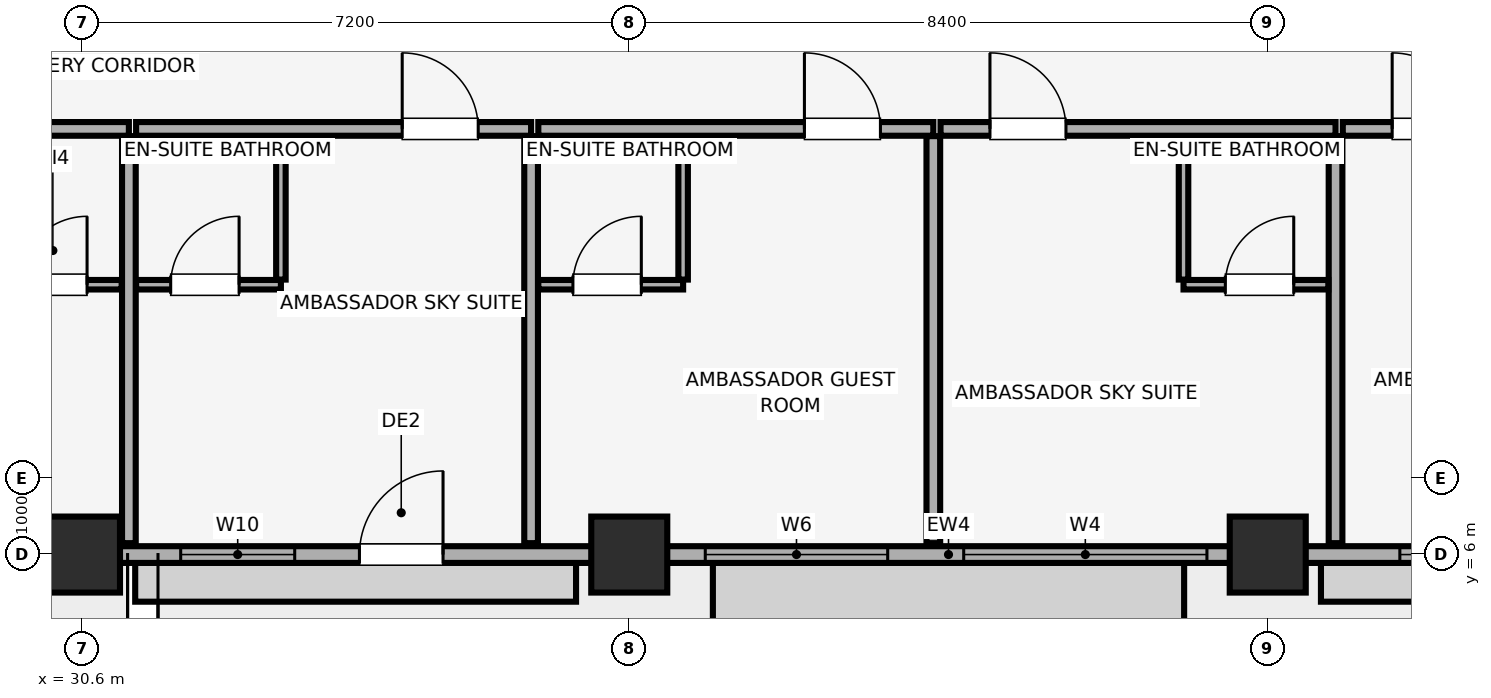
"""IFC4 building model, lengths in metres.
Left out: names, types, materials, properties, quantities, classifications, styles, units other than length and angle.
Written with IfcOpenShell. Run it as: python <this file> out.ifc"""

import sys

from ifc_helpers import new_model, si_unit, direction, frame, frame_2d, origin, origin_2d, place, context, subcontext, project, spatial, rectangle, extrude, element, fill, save


model = new_model("IFC4")
c1 = context("Model", 3, precision=1e-05, world=origin(), true_north=direction((0.0, 1.0)))
c2 = subcontext(c1, "Body", "Model", "MODEL_VIEW")
j1 = project(units=[si_unit("LENGTHUNIT", "METRE"), si_unit("PLANEANGLEUNIT", "RADIAN")], contexts=[c1])
p1 = place(None, origin())
s1 = spatial("IfcSite", under=j1, at=p1, CompositionType="ELEMENT")
p2 = place(p1, origin())
s2 = spatial("IfcBuilding", under=s1, at=p2, CompositionType="ELEMENT")
p3 = place(p2, frame((0.0, 0.0, 229.15)))
s3 = spatial("IfcBuildingStorey", under=s2, at=p3, CompositionType="ELEMENT", Elevation=229.15)
for number, where, z_axis, x_axis in (
    (1, (30.6, 6.0, 0.0), (0.0, 0.0, 1.0), (1.0, 0.0, 0.0)),
    (2, (37.8, 6.0, 0.0), (0.0, 0.0, 1.0), (1.0, 0.0, 0.0)),
    (3, (46.2, 6.0, 0.0), (0.0, 0.0, 1.0), (1.0, 0.0, 0.0)),
):
    element("IfcColumn", number, at=place(p3, frame(where, z_axis=z_axis, x_axis=x_axis)), inside=s3, PredefinedType="COLUMN", context=c2, shape_type="SweptSolid", body=[
        extrude(rectangle(XDim=1.0, YDim=1.0, at=origin_2d()), origin(), (0.0, 0.0, 1.0), 3.71),
    ])
p4 = place(p3, frame((9.8, 6.0, 0.0), z_axis=(0.0, 0.0, 1.0), x_axis=(1.0, 0.0, 0.0)))
e4 = element("IfcWall", 4, at=p4, inside=s3, PredefinedType="SOLIDWALL", context=c2, shape_type="SweptSolid", body=[
    extrude(rectangle(XDim=64.4, YDim=0.22, at=frame_2d((32.2, 0.0))), origin(), (0.0, 0.0, 1.0), 2.91),
])
p5 = place(p4, frame((3.25, 0.0, 0.0)))
e5 = element("IfcOpeningElement", 5, at=p5, cuts=e4, PredefinedType="OPENING", context=c2, shape_type="SweptSolid", body=[
    extrude(rectangle(XDim=1.1, YDim=2.15, at=frame_2d((0.55, 1.075))), frame((0.0, 0.12, 0.0), z_axis=(0.0, -1.0, 0.0), x_axis=(1.0, 0.0, 0.0)), (0.0, 0.0, 1.0), 0.24),
])
p6 = place(p4, frame((24.45, 0.0, 0.0)))
e6 = element("IfcOpeningElement", 6, at=p6, cuts=e4, PredefinedType="OPENING", context=c2, shape_type="SweptSolid", body=[
    extrude(rectangle(XDim=1.1, YDim=2.15, at=frame_2d((0.55, 1.075))), frame((0.0, 0.12, 0.0), z_axis=(0.0, -1.0, 0.0), x_axis=(1.0, 0.0, 0.0)), (0.0, 0.0, 1.0), 0.24),
])
p7 = place(p4, frame((45.65, 0.0, 0.0)))
e7 = element("IfcOpeningElement", 7, at=p7, cuts=e4, PredefinedType="OPENING", context=c2, shape_type="SweptSolid", body=[
    extrude(rectangle(XDim=1.1, YDim=2.15, at=frame_2d((0.55, 1.075))), frame((0.0, 0.12, 0.0), z_axis=(0.0, -1.0, 0.0), x_axis=(1.0, 0.0, 0.0)), (0.0, 0.0, 1.0), 0.24),
])
p8 = place(p4, frame((0.825, 0.0, 0.85)))
e8 = element("IfcOpeningElement", 8, at=p8, cuts=e4, PredefinedType="OPENING", context=c2, shape_type="SweptSolid", body=[
    extrude(rectangle(XDim=1.5, YDim=1.4, at=frame_2d((0.75, 0.7))), frame((0.0, 0.12, 0.0), z_axis=(0.0, -1.0, 0.0), x_axis=(1.0, 0.0, 0.0)), (0.0, 0.0, 1.0), 0.24),
])
p9 = place(p4, frame((7.217, 0.0, 0.85)))
e9 = element("IfcOpeningElement", 9, at=p9, cuts=e4, PredefinedType="OPENING", context=c2, shape_type="SweptSolid", body=[
    extrude(rectangle(XDim=3.2, YDim=1.85, at=frame_2d((1.6, 0.925))), frame((0.0, 0.12, 0.0), z_axis=(0.0, -1.0, 0.0), x_axis=(1.0, 0.0, 0.0)), (0.0, 0.0, 1.0), 0.24),
])
p10 = place(p4, frame((11.267, 0.0, 0.85)))
e10 = element("IfcOpeningElement", 10, at=p10, cuts=e4, PredefinedType="OPENING", context=c2, shape_type="SweptSolid", body=[
    extrude(rectangle(XDim=1.5, YDim=1.4, at=frame_2d((0.75, 0.7))), frame((0.0, 0.12, 0.0), z_axis=(0.0, -1.0, 0.0), x_axis=(1.0, 0.0, 0.0)), (0.0, 0.0, 1.0), 0.24),
])
p11 = place(p4, frame((16.663, 0.0, 0.85)))
e11 = element("IfcOpeningElement", 11, at=p11, cuts=e4, PredefinedType="OPENING", context=c2, shape_type="SweptSolid", body=[
    extrude(rectangle(XDim=3.2, YDim=1.85, at=frame_2d((1.6, 0.925))), frame((0.0, 0.12, 0.0), z_axis=(0.0, -1.0, 0.0), x_axis=(1.0, 0.0, 0.0)), (0.0, 0.0, 1.0), 0.24),
])
p12 = place(p4, frame((22.098, 0.0, 0.85)))
e12 = element("IfcOpeningElement", 12, at=p12, cuts=e4, PredefinedType="OPENING", context=c2, shape_type="SweptSolid", body=[
    extrude(rectangle(XDim=1.5, YDim=1.4, at=frame_2d((0.75, 0.7))), frame((0.0, 0.12, 0.0), z_axis=(0.0, -1.0, 0.0), x_axis=(1.0, 0.0, 0.0)), (0.0, 0.0, 1.0), 0.24),
])
p13 = place(p4, frame((29.0, 0.0, 0.85)))
e13 = element("IfcOpeningElement", 13, at=p13, cuts=e4, PredefinedType="OPENING", context=c2, shape_type="SweptSolid", body=[
    extrude(rectangle(XDim=2.4, YDim=1.5, at=frame_2d((1.2, 0.75))), frame((0.0, 0.12, 0.0), z_axis=(0.0, -1.0, 0.0), x_axis=(1.0, 0.0, 0.0)), (0.0, 0.0, 1.0), 0.24),
])
p14 = place(p4, frame((32.4, 0.0, 0.85)))
e14 = element("IfcOpeningElement", 14, at=p14, cuts=e4, PredefinedType="OPENING", context=c2, shape_type="SweptSolid", body=[
    extrude(rectangle(XDim=3.2, YDim=1.85, at=frame_2d((1.6, 0.925))), frame((0.0, 0.12, 0.0), z_axis=(0.0, -1.0, 0.0), x_axis=(1.0, 0.0, 0.0)), (0.0, 0.0, 1.0), 0.24),
])
p15 = place(p4, frame((38.138, 0.0, 0.85)))
e15 = element("IfcOpeningElement", 15, at=p15, cuts=e4, PredefinedType="OPENING", context=c2, shape_type="SweptSolid", body=[
    extrude(rectangle(XDim=3.6, YDim=1.75, at=frame_2d((1.8, 0.875))), frame((0.0, 0.12, 0.0), z_axis=(0.0, -1.0, 0.0), x_axis=(1.0, 0.0, 0.0)), (0.0, 0.0, 1.0), 0.24),
])
p16 = place(p4, frame((48.387, 0.0, 0.85)))
e16 = element("IfcOpeningElement", 16, at=p16, cuts=e4, PredefinedType="OPENING", context=c2, shape_type="SweptSolid", body=[
    extrude(rectangle(XDim=1.5, YDim=1.4, at=frame_2d((0.75, 0.7))), frame((0.0, 0.12, 0.0), z_axis=(0.0, -1.0, 0.0), x_axis=(1.0, 0.0, 0.0)), (0.0, 0.0, 1.0), 0.24),
])
p17 = place(p4, frame((53.583, 0.0, 0.85)))
e17 = element("IfcOpeningElement", 17, at=p17, cuts=e4, PredefinedType="OPENING", context=c2, shape_type="SweptSolid", body=[
    extrude(rectangle(XDim=3.6, YDim=1.75, at=frame_2d((1.8, 0.875))), frame((0.0, 0.12, 0.0), z_axis=(0.0, -1.0, 0.0), x_axis=(1.0, 0.0, 0.0)), (0.0, 0.0, 1.0), 0.24),
])
p18 = place(p4, frame((59.695, 0.0, 0.85)))
e18 = element("IfcOpeningElement", 18, at=p18, cuts=e4, PredefinedType="OPENING", context=c2, shape_type="SweptSolid", body=[
    extrude(rectangle(XDim=3.6, YDim=1.75, at=frame_2d((1.8, 0.875))), frame((0.0, 0.12, 0.0), z_axis=(0.0, -1.0, 0.0), x_axis=(1.0, 0.0, 0.0)), (0.0, 0.0, 1.0), 0.24),
])
p19 = place(p3, frame((26.02, 11.6, 0.0), z_axis=(0.0, 0.0, 1.0), x_axis=(1.0, 0.0, 0.0)))
e19 = element("IfcWall", 19, at=p19, inside=s3, PredefinedType="PARTITIONING", context=c2, shape_type="SweptSolid", body=[
    extrude(rectangle(XDim=5.197, YDim=0.18, at=frame_2d((2.598, 0.0))), origin(), (0.0, 0.0, 1.0), 3.71),
])
p20 = place(p19, frame((0.65, 0.0, 0.0)))
e20 = element("IfcOpeningElement", 20, at=p20, cuts=e19, PredefinedType="OPENING", context=c2, shape_type="SweptSolid", body=[
    extrude(rectangle(XDim=1.0, YDim=2.15, at=frame_2d((0.5, 1.075))), frame((0.0, 0.1, 0.0), z_axis=(0.0, -1.0, 0.0), x_axis=(1.0, 0.0, 0.0)), (0.0, 0.0, 1.0), 0.2),
])
p21 = place(p3, frame((31.217, 6.15, 0.0), z_axis=(0.0, 0.0, 1.0), x_axis=(0.0, 1.0, 0.0)))
e21 = element("IfcWall", 21, at=p21, inside=s3, PredefinedType="PARTITIONING", context=c2, shape_type="SweptSolid", body=[
    extrude(rectangle(XDim=5.355, YDim=0.18, at=frame_2d((2.677, 0.0))), origin(), (0.0, 0.0, 1.0), 3.71),
])
p22 = place(p3, frame((29.217, 9.55, 0.0), z_axis=(0.0, 0.0, 1.0), x_axis=(1.0, 0.0, 0.0)))
e22 = element("IfcWall", 22, at=p22, inside=s3, PredefinedType="PARTITIONING", context=c2, shape_type="SweptSolid", body=[
    extrude(rectangle(XDim=1.905, YDim=0.125, at=frame_2d((0.953, 0.0))), origin(), (0.0, 0.0, 1.0), 3.71),
])
p23 = place(p22, frame((0.55, 0.0, 0.0)))
e23 = element("IfcOpeningElement", 23, at=p23, cuts=e22, PredefinedType="OPENING", context=c2, shape_type="SweptSolid", body=[
    extrude(rectangle(XDim=0.9, YDim=2.1, at=frame_2d((0.45, 1.05))), frame((0.0, 0.073, 0.0), z_axis=(0.0, -1.0, 0.0), x_axis=(1.0, 0.0, 0.0)), (0.0, 0.0, 1.0), 0.145),
])
p24 = place(p3, frame((31.312, 11.6, 0.0), z_axis=(0.0, 0.0, 1.0), x_axis=(1.0, 0.0, 0.0)))
e24 = element("IfcWall", 24, at=p24, inside=s3, PredefinedType="PARTITIONING", context=c2, shape_type="SweptSolid", body=[
    extrude(rectangle(XDim=5.197, YDim=0.18, at=frame_2d((2.598, 0.0))), origin(), (0.0, 0.0, 1.0), 3.71),
])
p25 = place(p24, frame((3.501, 0.0, 0.0)))
e25 = element("IfcOpeningElement", 25, at=p25, cuts=e24, PredefinedType="OPENING", context=c2, shape_type="SweptSolid", body=[
    extrude(rectangle(XDim=1.0, YDim=2.15, at=frame_2d((0.5, 1.075))), frame((0.0, 0.1, 0.0), z_axis=(0.0, -1.0, 0.0), x_axis=(1.0, 0.0, 0.0)), (0.0, 0.0, 1.0), 0.2),
])
p26 = place(p3, frame((36.509, 6.15, 0.0), z_axis=(0.0, 0.0, 1.0), x_axis=(0.0, 1.0, 0.0)))
e26 = element("IfcWall", 26, at=p26, inside=s3, PredefinedType="PARTITIONING", context=c2, shape_type="SweptSolid", body=[
    extrude(rectangle(XDim=5.355, YDim=0.18, at=frame_2d((2.677, 0.0))), origin(), (0.0, 0.0, 1.0), 3.71),
])
p27 = place(p3, frame((31.312, 9.55, 0.0), z_axis=(0.0, 0.0, 1.0), x_axis=(1.0, 0.0, 0.0)))
e27 = element("IfcWall", 27, at=p27, inside=s3, PredefinedType="PARTITIONING", context=c2, shape_type="SweptSolid", body=[
    extrude(rectangle(XDim=1.905, YDim=0.125, at=frame_2d((0.952, 0.0))), origin(), (0.0, 0.0, 1.0), 3.71),
])
p28 = place(p27, frame((0.455, 0.0, 0.0)))
e28 = element("IfcOpeningElement", 28, at=p28, cuts=e27, PredefinedType="OPENING", context=c2, shape_type="SweptSolid", body=[
    extrude(rectangle(XDim=0.9, YDim=2.1, at=frame_2d((0.45, 1.05))), frame((0.0, 0.073, 0.0), z_axis=(0.0, -1.0, 0.0), x_axis=(1.0, 0.0, 0.0)), (0.0, 0.0, 1.0), 0.145),
])
p29 = place(p3, frame((33.217, 9.617, 0.0), z_axis=(0.0, 0.0, 1.0), x_axis=(0.0, 1.0, 0.0)))
e29 = element("IfcWall", 29, at=p29, inside=s3, PredefinedType="PARTITIONING", context=c2, shape_type="SweptSolid", body=[
    extrude(rectangle(XDim=1.887, YDim=0.125, at=frame_2d((0.944, 0.0))), origin(), (0.0, 0.0, 1.0), 3.71),
])
p30 = place(p3, frame((36.604, 11.6, 0.0), z_axis=(0.0, 0.0, 1.0), x_axis=(1.0, 0.0, 0.0)))
e30 = element("IfcWall", 30, at=p30, inside=s3, PredefinedType="PARTITIONING", context=c2, shape_type="SweptSolid", body=[
    extrude(rectangle(XDim=5.197, YDim=0.18, at=frame_2d((2.598, 0.0))), origin(), (0.0, 0.0, 1.0), 3.71),
])
p31 = place(p30, frame((3.501, 0.0, 0.0)))
e31 = element("IfcOpeningElement", 31, at=p31, cuts=e30, PredefinedType="OPENING", context=c2, shape_type="SweptSolid", body=[
    extrude(rectangle(XDim=1.0, YDim=2.15, at=frame_2d((0.5, 1.075))), frame((0.0, 0.1, 0.0), z_axis=(0.0, -1.0, 0.0), x_axis=(1.0, 0.0, 0.0)), (0.0, 0.0, 1.0), 0.2),
])
p32 = place(p3, frame((41.8, 6.15, 0.0), z_axis=(0.0, 0.0, 1.0), x_axis=(0.0, 1.0, 0.0)))
e32 = element("IfcWall", 32, at=p32, inside=s3, PredefinedType="PARTITIONING", context=c2, shape_type="SweptSolid", body=[
    extrude(rectangle(XDim=5.355, YDim=0.18, at=frame_2d((2.677, 0.0))), origin(), (0.0, 0.0, 1.0), 3.26),
])
p33 = place(p3, frame((36.604, 9.55, 0.0), z_axis=(0.0, 0.0, 1.0), x_axis=(1.0, 0.0, 0.0)))
e33 = element("IfcWall", 33, at=p33, inside=s3, PredefinedType="PARTITIONING", context=c2, shape_type="SweptSolid", body=[
    extrude(rectangle(XDim=1.905, YDim=0.125, at=frame_2d((0.953, 0.0))), origin(), (0.0, 0.0, 1.0), 3.71),
])
p34 = place(p33, frame((0.455, 0.0, 0.0)))
e34 = element("IfcOpeningElement", 34, at=p34, cuts=e33, PredefinedType="OPENING", context=c2, shape_type="SweptSolid", body=[
    extrude(rectangle(XDim=0.9, YDim=2.1, at=frame_2d((0.45, 1.05))), frame((0.0, 0.073, 0.0), z_axis=(0.0, -1.0, 0.0), x_axis=(1.0, 0.0, 0.0)), (0.0, 0.0, 1.0), 0.145),
])
p35 = place(p3, frame((38.509, 9.617, 0.0), z_axis=(0.0, 0.0, 1.0), x_axis=(0.0, 1.0, 0.0)))
e35 = element("IfcWall", 35, at=p35, inside=s3, PredefinedType="PARTITIONING", context=c2, shape_type="SweptSolid", body=[
    extrude(rectangle(XDim=1.887, YDim=0.125, at=frame_2d((0.944, 0.0))), origin(), (0.0, 0.0, 1.0), 3.71),
])
p36 = place(p3, frame((41.895, 11.6, 0.0), z_axis=(0.0, 0.0, 1.0), x_axis=(1.0, 0.0, 0.0)))
e36 = element("IfcWall", 36, at=p36, inside=s3, PredefinedType="PARTITIONING", context=c2, shape_type="SweptSolid", body=[
    extrude(rectangle(XDim=5.197, YDim=0.18, at=frame_2d((2.598, 0.0))), origin(), (0.0, 0.0, 1.0), 3.71),
])
p37 = place(p36, frame((0.65, 0.0, 0.0)))
e37 = element("IfcOpeningElement", 37, at=p37, cuts=e36, PredefinedType="OPENING", context=c2, shape_type="SweptSolid", body=[
    extrude(rectangle(XDim=1.0, YDim=2.15, at=frame_2d((0.5, 1.075))), frame((0.0, 0.1, 0.0), z_axis=(0.0, -1.0, 0.0), x_axis=(1.0, 0.0, 0.0)), (0.0, 0.0, 1.0), 0.2),
])
p38 = place(p3, frame((47.092, 6.15, 0.0), z_axis=(0.0, 0.0, 1.0), x_axis=(0.0, 1.0, 0.0)))
e38 = element("IfcWall", 38, at=p38, inside=s3, PredefinedType="PARTITIONING", context=c2, shape_type="SweptSolid", body=[
    extrude(rectangle(XDim=5.355, YDim=0.18, at=frame_2d((2.677, 0.0))), origin(), (0.0, 0.0, 1.0), 3.71),
])
p39 = place(p3, frame((45.092, 9.55, 0.0), z_axis=(0.0, 0.0, 1.0), x_axis=(1.0, 0.0, 0.0)))
e39 = element("IfcWall", 39, at=p39, inside=s3, PredefinedType="PARTITIONING", context=c2, shape_type="SweptSolid", body=[
    extrude(rectangle(XDim=1.905, YDim=0.125, at=frame_2d((0.953, 0.0))), origin(), (0.0, 0.0, 1.0), 3.71),
])
p40 = place(p39, frame((0.55, 0.0, 0.0)))
e40 = element("IfcOpeningElement", 40, at=p40, cuts=e39, PredefinedType="OPENING", context=c2, shape_type="SweptSolid", body=[
    extrude(rectangle(XDim=0.9, YDim=2.1, at=frame_2d((0.45, 1.05))), frame((0.0, 0.073, 0.0), z_axis=(0.0, -1.0, 0.0), x_axis=(1.0, 0.0, 0.0)), (0.0, 0.0, 1.0), 0.145),
])
p41 = place(p3, frame((45.092, 9.617, 0.0), z_axis=(0.0, 0.0, 1.0), x_axis=(0.0, 1.0, 0.0)))
e41 = element("IfcWall", 41, at=p41, inside=s3, PredefinedType="PARTITIONING", context=c2, shape_type="SweptSolid", body=[
    extrude(rectangle(XDim=1.887, YDim=0.125, at=frame_2d((0.944, 0.0))), origin(), (0.0, 0.0, 1.0), 3.71),
])
p42 = place(p3, frame((47.187, 11.6, 0.0), z_axis=(0.0, 0.0, 1.0), x_axis=(1.0, 0.0, 0.0)))
e42 = element("IfcWall", 42, at=p42, inside=s3, PredefinedType="PARTITIONING", context=c2, shape_type="SweptSolid", body=[
    extrude(rectangle(XDim=5.197, YDim=0.18, at=frame_2d((2.598, 0.0))), origin(), (0.0, 0.0, 1.0), 3.71),
])
p43 = place(p42, frame((0.65, 0.0, 0.0)))
e43 = element("IfcOpeningElement", 43, at=p43, cuts=e42, PredefinedType="OPENING", context=c2, shape_type="SweptSolid", body=[
    extrude(rectangle(XDim=1.0, YDim=2.15, at=frame_2d((0.5, 1.075))), frame((0.0, 0.1, 0.0), z_axis=(0.0, -1.0, 0.0), x_axis=(1.0, 0.0, 0.0)), (0.0, 0.0, 1.0), 0.2),
])
p44 = place(p6, origin())
e44 = element("IfcDoor", 44, at=p44, inside=s3, OperationType="SINGLE_SWING_RIGHT", PredefinedType="DOOR", context=c2, shape_type="SweptSolid", body=[
    extrude(rectangle(XDim=1.1, YDim=2.15, at=frame_2d((0.55, 1.075))), frame((0.0, 0.025, 0.0), z_axis=(0.0, -1.0, 0.0), x_axis=(1.0, 0.0, 0.0)), (0.0, 0.0, 1.0), 0.05),
])
fill(e6, e44)
p45 = place(p12, origin())
e45 = element("IfcWindow", 45, at=p45, inside=s3, PartitioningType="SINGLE_PANEL", PredefinedType="WINDOW", context=c2, shape_type="SweptSolid", body=[
    extrude(rectangle(XDim=1.5, YDim=1.4, at=frame_2d((0.75, 0.7))), frame((0.0, 0.03, 0.0), z_axis=(0.0, -1.0, 0.0), x_axis=(1.0, 0.0, 0.0)), (0.0, 0.0, 1.0), 0.06),
])
fill(e12, e45)
p46 = place(p13, origin())
e46 = element("IfcWindow", 46, at=p46, inside=s3, PartitioningType="SINGLE_PANEL", PredefinedType="WINDOW", context=c2, shape_type="SweptSolid", body=[
    extrude(rectangle(XDim=2.4, YDim=1.5, at=frame_2d((1.2, 0.75))), frame((0.0, 0.03, 0.0), z_axis=(0.0, -1.0, 0.0), x_axis=(1.0, 0.0, 0.0)), (0.0, 0.0, 1.0), 0.06),
])
fill(e13, e46)
p47 = place(p14, origin())
e47 = element("IfcWindow", 47, at=p47, inside=s3, PartitioningType="SINGLE_PANEL", PredefinedType="WINDOW", context=c2, shape_type="SweptSolid", body=[
    extrude(rectangle(XDim=3.2, YDim=1.85, at=frame_2d((1.6, 0.925))), frame((0.0, 0.03, 0.0), z_axis=(0.0, -1.0, 0.0), x_axis=(1.0, 0.0, 0.0)), (0.0, 0.0, 1.0), 0.06),
])
fill(e14, e47)
p48 = place(p15, origin())
e48 = element("IfcWindow", 48, at=p48, inside=s3, PartitioningType="SINGLE_PANEL", PredefinedType="WINDOW", context=c2, shape_type="SweptSolid", body=[
    extrude(rectangle(XDim=3.6, YDim=1.75, at=frame_2d((1.8, 0.875))), frame((0.0, 0.03, 0.0), z_axis=(0.0, -1.0, 0.0), x_axis=(1.0, 0.0, 0.0)), (0.0, 0.0, 1.0), 0.06),
])
fill(e15, e48)
p49 = place(p23, origin())
e49 = element("IfcDoor", 49, at=p49, inside=s3, OperationType="SINGLE_SWING_RIGHT", PredefinedType="DOOR", context=c2, shape_type="SweptSolid", body=[
    extrude(rectangle(XDim=0.9, YDim=2.1, at=frame_2d((0.45, 1.05))), frame((0.0, 0.025, 0.0), z_axis=(0.0, -1.0, 0.0), x_axis=(1.0, 0.0, 0.0)), (0.0, 0.0, 1.0), 0.05),
])
fill(e23, e49)
p50 = place(p25, origin())
e50 = element("IfcDoor", 50, at=p50, inside=s3, OperationType="SINGLE_SWING_LEFT", PredefinedType="DOOR", context=c2, shape_type="SweptSolid", body=[
    extrude(rectangle(XDim=1.0, YDim=2.15, at=frame_2d((0.5, 1.075))), frame((0.0, 0.025, 0.0), z_axis=(0.0, -1.0, 0.0), x_axis=(1.0, 0.0, 0.0)), (0.0, 0.0, 1.0), 0.05),
])
fill(e25, e50)
p51 = place(p28, origin())
e51 = element("IfcDoor", 51, at=p51, inside=s3, OperationType="SINGLE_SWING_RIGHT", PredefinedType="DOOR", context=c2, shape_type="SweptSolid", body=[
    extrude(rectangle(XDim=0.9, YDim=2.1, at=frame_2d((0.45, 1.05))), frame((0.0, 0.025, 0.0), z_axis=(0.0, -1.0, 0.0), x_axis=(1.0, 0.0, 0.0)), (0.0, 0.0, 1.0), 0.05),
])
fill(e28, e51)
p52 = place(p31, origin())
e52 = element("IfcDoor", 52, at=p52, inside=s3, OperationType="SINGLE_SWING_LEFT", PredefinedType="DOOR", context=c2, shape_type="SweptSolid", body=[
    extrude(rectangle(XDim=1.0, YDim=2.15, at=frame_2d((0.5, 1.075))), frame((0.0, 0.025, 0.0), z_axis=(0.0, -1.0, 0.0), x_axis=(1.0, 0.0, 0.0)), (0.0, 0.0, 1.0), 0.05),
])
fill(e31, e52)
p53 = place(p34, origin())
e53 = element("IfcDoor", 53, at=p53, inside=s3, OperationType="SINGLE_SWING_RIGHT", PredefinedType="DOOR", context=c2, shape_type="SweptSolid", body=[
    extrude(rectangle(XDim=0.9, YDim=2.1, at=frame_2d((0.45, 1.05))), frame((0.0, 0.025, 0.0), z_axis=(0.0, -1.0, 0.0), x_axis=(1.0, 0.0, 0.0)), (0.0, 0.0, 1.0), 0.05),
])
fill(e34, e53)
p54 = place(p37, origin())
e54 = element("IfcDoor", 54, at=p54, inside=s3, OperationType="SINGLE_SWING_LEFT", PredefinedType="DOOR", context=c2, shape_type="SweptSolid", body=[
    extrude(rectangle(XDim=1.0, YDim=2.15, at=frame_2d((0.5, 1.075))), frame((0.0, 0.025, 0.0), z_axis=(0.0, -1.0, 0.0), x_axis=(1.0, 0.0, 0.0)), (0.0, 0.0, 1.0), 0.05),
])
fill(e37, e54)
p55 = place(p40, origin())
e55 = element("IfcDoor", 55, at=p55, inside=s3, OperationType="SINGLE_SWING_RIGHT", PredefinedType="DOOR", context=c2, shape_type="SweptSolid", body=[
    extrude(rectangle(XDim=0.9, YDim=2.1, at=frame_2d((0.45, 1.05))), frame((0.0, 0.025, 0.0), z_axis=(0.0, -1.0, 0.0), x_axis=(1.0, 0.0, 0.0)), (0.0, 0.0, 1.0), 0.05),
])
fill(e40, e55)
p56 = place(p43, origin())
e56 = element("IfcDoor", 56, at=p56, inside=s3, OperationType="SINGLE_SWING_LEFT", PredefinedType="DOOR", context=c2, shape_type="SweptSolid", body=[
    extrude(rectangle(XDim=1.0, YDim=2.15, at=frame_2d((0.5, 1.075))), frame((0.0, 0.025, 0.0), z_axis=(0.0, -1.0, 0.0), x_axis=(1.0, 0.0, 0.0)), (0.0, 0.0, 1.0), 0.05),
])
fill(e43, e56)
save(model, sys.argv[1])
